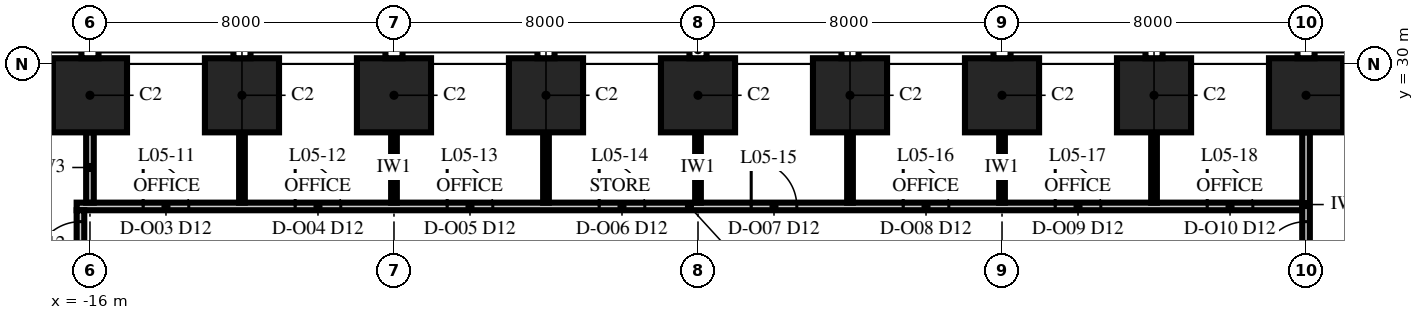
"""IFC4 building model, lengths in metres.
Left out: names, types, materials, properties, quantities, classifications, styles, units other than length and angle.
Written with IfcOpenShell. Run it as: python <this file> out.ifc"""

import sys

from ifc_helpers import new_model, si_unit, direction, frame, frame_2d, origin, origin_2d, place, context, subcontext, project, spatial, rectangle, extrude, element, fill, save


model = new_model("IFC4")
c1 = context("Model", 3, precision=1e-05, world=origin(), true_north=direction((0.0, 1.0)))
c2 = subcontext(c1, "Body", "Model", "MODEL_VIEW")
j1 = project(units=[si_unit("LENGTHUNIT", "METRE"), si_unit("PLANEANGLEUNIT", "RADIAN")], contexts=[c1])
p1 = place(None, origin())
s1 = spatial("IfcSite", under=j1, at=p1, CompositionType="ELEMENT")
p2 = place(p1, origin())
s2 = spatial("IfcBuilding", under=s1, at=p2, CompositionType="ELEMENT")
p3 = place(p2, frame((0.0, 0.0, 32.0)))
s3 = spatial("IfcBuildingStorey", under=s2, at=p3, CompositionType="ELEMENT", Elevation=32.0)
for number, where, z_axis, x_axis in (
    (1, (16.0, 29.175, 0.0), (0.0, 0.0, 1.0), (-1.0, 0.0, 0.0)),
    (2, (12.0, 29.175, 0.0), (0.0, 0.0, 1.0), (-1.0, 0.0, 0.0)),
    (3, (8.0, 29.175, 0.0), (0.0, 0.0, 1.0), (-1.0, 0.0, 0.0)),
    (4, (4.0, 29.175, 0.0), (0.0, 0.0, 1.0), (-1.0, 0.0, 0.0)),
    (5, (0.0, 29.175, 0.0), (0.0, 0.0, 1.0), (-1.0, 0.0, 0.0)),
    (6, (-4.0, 29.175, 0.0), (0.0, 0.0, 1.0), (-1.0, 0.0, 0.0)),
    (7, (-8.0, 29.175, 0.0), (0.0, 0.0, 1.0), (-1.0, 0.0, 0.0)),
    (8, (-12.0, 29.175, 0.0), (0.0, 0.0, 1.0), (-1.0, 0.0, 0.0)),
    (9, (-16.0, 29.175, 0.0), (0.0, 0.0, 1.0), (-1.0, 0.0, 0.0)),
):
    element("IfcColumn", number, at=place(p3, frame(where, z_axis=z_axis, x_axis=x_axis)), inside=s3, PredefinedType="COLUMN", context=c2, shape_type="SweptSolid", body=[
        extrude(rectangle(XDim=1.95, YDim=1.95, at=origin_2d()), origin(), (0.0, 0.0, 1.0), 4.0),
    ])
p4 = place(p3, frame((-16.35, 26.25, 0.0), z_axis=(0.0, 0.0, 1.0), x_axis=(1.0, 0.0, 0.0)))
e10 = element("IfcWall", 10, at=p4, inside=s3, PredefinedType="PARTITIONING", context=c2, shape_type="SweptSolid", body=[
    extrude(rectangle(XDim=32.25, YDim=0.2, at=frame_2d((16.125, 0.0))), origin(), (0.0, 0.0, 1.0), 3.4),
])
p5 = place(p4, frame((1.75, 0.0, 0.0)))
e11 = element("IfcOpeningElement", 11, at=p5, cuts=e10, PredefinedType="OPENING", context=c2, shape_type="SweptSolid", body=[
    extrude(rectangle(XDim=1.2, YDim=2.4, at=frame_2d((0.6, 1.2))), frame((0.0, 0.115, 0.0), z_axis=(0.0, -1.0, 0.0), x_axis=(1.0, 0.0, 0.0)), (0.0, 0.0, 1.0), 0.23),
])
p6 = place(p4, frame((5.75, 0.0, 0.0)))
e12 = element("IfcOpeningElement", 12, at=p6, cuts=e10, PredefinedType="OPENING", context=c2, shape_type="SweptSolid", body=[
    extrude(rectangle(XDim=1.2, YDim=2.4, at=frame_2d((0.6, 1.2))), frame((0.0, 0.115, 0.0), z_axis=(0.0, -1.0, 0.0), x_axis=(1.0, 0.0, 0.0)), (0.0, 0.0, 1.0), 0.23),
])
p7 = place(p4, frame((9.75, 0.0, 0.0)))
e13 = element("IfcOpeningElement", 13, at=p7, cuts=e10, PredefinedType="OPENING", context=c2, shape_type="SweptSolid", body=[
    extrude(rectangle(XDim=1.2, YDim=2.4, at=frame_2d((0.6, 1.2))), frame((0.0, 0.115, 0.0), z_axis=(0.0, -1.0, 0.0), x_axis=(1.0, 0.0, 0.0)), (0.0, 0.0, 1.0), 0.23),
])
p8 = place(p4, frame((13.75, 0.0, 0.0)))
e14 = element("IfcOpeningElement", 14, at=p8, cuts=e10, PredefinedType="OPENING", context=c2, shape_type="SweptSolid", body=[
    extrude(rectangle(XDim=1.2, YDim=2.4, at=frame_2d((0.6, 1.2))), frame((0.0, 0.115, 0.0), z_axis=(0.0, -1.0, 0.0), x_axis=(1.0, 0.0, 0.0)), (0.0, 0.0, 1.0), 0.23),
])
p9 = place(p4, frame((17.75, 0.0, 0.0)))
e15 = element("IfcOpeningElement", 15, at=p9, cuts=e10, PredefinedType="OPENING", context=c2, shape_type="SweptSolid", body=[
    extrude(rectangle(XDim=1.2, YDim=2.4, at=frame_2d((0.6, 1.2))), frame((0.0, 0.115, 0.0), z_axis=(0.0, -1.0, 0.0), x_axis=(1.0, 0.0, 0.0)), (0.0, 0.0, 1.0), 0.23),
])
p10 = place(p4, frame((21.75, 0.0, 0.0)))
e16 = element("IfcOpeningElement", 16, at=p10, cuts=e10, PredefinedType="OPENING", context=c2, shape_type="SweptSolid", body=[
    extrude(rectangle(XDim=1.2, YDim=2.4, at=frame_2d((0.6, 1.2))), frame((0.0, 0.115, 0.0), z_axis=(0.0, -1.0, 0.0), x_axis=(1.0, 0.0, 0.0)), (0.0, 0.0, 1.0), 0.23),
])
p11 = place(p4, frame((25.75, 0.0, 0.0)))
e17 = element("IfcOpeningElement", 17, at=p11, cuts=e10, PredefinedType="OPENING", context=c2, shape_type="SweptSolid", body=[
    extrude(rectangle(XDim=1.2, YDim=2.4, at=frame_2d((0.6, 1.2))), frame((0.0, 0.115, 0.0), z_axis=(0.0, -1.0, 0.0), x_axis=(1.0, 0.0, 0.0)), (0.0, 0.0, 1.0), 0.23),
])
p12 = place(p4, frame((29.75, 0.0, 0.0)))
e18 = element("IfcOpeningElement", 18, at=p12, cuts=e10, PredefinedType="OPENING", context=c2, shape_type="SweptSolid", body=[
    extrude(rectangle(XDim=1.2, YDim=2.4, at=frame_2d((0.6, 1.2))), frame((0.0, 0.115, 0.0), z_axis=(0.0, -1.0, 0.0), x_axis=(1.0, 0.0, 0.0)), (0.0, 0.0, 1.0), 0.23),
])
p13 = place(p3, frame((-16.25, 9.9, 0.0), z_axis=(0.0, 0.0, 1.0), x_axis=(0.0, 1.0, 0.0)))
e19 = element("IfcWall", 19, at=p13, inside=s3, PredefinedType="PARTITIONING", context=c2, shape_type="SweptSolid", body=[
    extrude(rectangle(XDim=16.25, YDim=0.2, at=frame_2d((8.125, 0.0))), origin(), (0.0, 0.0, 1.0), 3.25),
])
p14 = place(p13, frame((14.75, 0.0, 0.0)))
e20 = element("IfcOpeningElement", 20, at=p14, cuts=e19, PredefinedType="OPENING", context=c2, shape_type="SweptSolid", body=[
    extrude(rectangle(XDim=1.2, YDim=2.4, at=frame_2d((0.6, 1.2))), frame((0.0, 0.115, 0.0), z_axis=(0.0, -1.0, 0.0), x_axis=(1.0, 0.0, 0.0)), (0.0, 0.0, 1.0), 0.23),
])
p15 = place(p3, frame((-16.0, 26.35, 0.0), z_axis=(0.0, 0.0, 1.0), x_axis=(0.0, 1.0, 0.0)))
e21 = element("IfcWall", 21, at=p15, inside=s3, PredefinedType="PARTITIONING", context=c2, shape_type="SweptSolid", body=[
    extrude(rectangle(XDim=1.85, YDim=0.2, at=frame_2d((0.925, 0.0))), origin(), (0.0, 0.0, 1.0), 3.4),
])
p16 = place(p3, frame((-12.0, 26.35, 0.0), z_axis=(0.0, 0.0, 1.0), x_axis=(0.0, 1.0, 0.0)))
e22 = element("IfcWall", 22, at=p16, inside=s3, PredefinedType="PARTITIONING", context=c2, shape_type="SweptSolid", body=[
    extrude(rectangle(XDim=1.85, YDim=0.15, at=frame_2d((0.925, 0.0))), origin(), (0.0, 0.0, 1.0), 3.85),
])
p17 = place(p3, frame((-8.0, 26.35, 0.0), z_axis=(0.0, 0.0, 1.0), x_axis=(0.0, 1.0, 0.0)))
e23 = element("IfcWall", 23, at=p17, inside=s3, PredefinedType="PARTITIONING", context=c2, shape_type="SweptSolid", body=[
    extrude(rectangle(XDim=1.85, YDim=0.15, at=frame_2d((0.925, 0.0))), origin(), (0.0, 0.0, 1.0), 3.4),
])
p18 = place(p3, frame((-4.0, 26.35, 0.0), z_axis=(0.0, 0.0, 1.0), x_axis=(0.0, 1.0, 0.0)))
e24 = element("IfcWall", 24, at=p18, inside=s3, PredefinedType="PARTITIONING", context=c2, shape_type="SweptSolid", body=[
    extrude(rectangle(XDim=1.85, YDim=0.15, at=frame_2d((0.925, 0.0))), origin(), (0.0, 0.0, 1.0), 3.85),
])
p19 = place(p3, frame((0.0, 26.35, 0.0), z_axis=(0.0, 0.0, 1.0), x_axis=(0.0, 1.0, 0.0)))
e25 = element("IfcWall", 25, at=p19, inside=s3, PredefinedType="PARTITIONING", context=c2, shape_type="SweptSolid", body=[
    extrude(rectangle(XDim=1.85, YDim=0.15, at=frame_2d((0.925, 0.0))), origin(), (0.0, 0.0, 1.0), 3.4),
])
p20 = place(p3, frame((4.0, 26.35, 0.0), z_axis=(0.0, 0.0, 1.0), x_axis=(0.0, 1.0, 0.0)))
e26 = element("IfcWall", 26, at=p20, inside=s3, PredefinedType="PARTITIONING", context=c2, shape_type="SweptSolid", body=[
    extrude(rectangle(XDim=1.85, YDim=0.15, at=frame_2d((0.925, 0.0))), origin(), (0.0, 0.0, 1.0), 3.85),
])
p21 = place(p3, frame((8.0, 26.35, 0.0), z_axis=(0.0, 0.0, 1.0), x_axis=(0.0, 1.0, 0.0)))
e27 = element("IfcWall", 27, at=p21, inside=s3, PredefinedType="PARTITIONING", context=c2, shape_type="SweptSolid", body=[
    extrude(rectangle(XDim=1.85, YDim=0.15, at=frame_2d((0.925, 0.0))), origin(), (0.0, 0.0, 1.0), 3.4),
])
p22 = place(p3, frame((12.0, 26.35, 0.0), z_axis=(0.0, 0.0, 1.0), x_axis=(0.0, 1.0, 0.0)))
e28 = element("IfcWall", 28, at=p22, inside=s3, PredefinedType="PARTITIONING", context=c2, shape_type="SweptSolid", body=[
    extrude(rectangle(XDim=1.85, YDim=0.15, at=frame_2d((0.925, 0.0))), origin(), (0.0, 0.0, 1.0), 3.85),
])
p23 = place(p3, frame((16.0, 24.4, 0.0), z_axis=(0.0, 0.0, 1.0), x_axis=(0.0, 1.0, 0.0)))
e29 = element("IfcWall", 29, at=p23, inside=s3, PredefinedType="PARTITIONING", context=c2, shape_type="SweptSolid", body=[
    extrude(rectangle(XDim=3.8, YDim=0.2, at=frame_2d((1.9, 0.0))), origin(), (0.0, 0.0, 1.0), 3.4),
])
p24 = place(p23, frame((0.25, 0.0, 0.0)))
e30 = element("IfcOpeningElement", 30, at=p24, cuts=e29, PredefinedType="OPENING", context=c2, shape_type="SweptSolid", body=[
    extrude(rectangle(XDim=1.2, YDim=2.4, at=frame_2d((0.6, 1.2))), frame((0.0, 0.115, 0.0), z_axis=(0.0, -1.0, 0.0), x_axis=(1.0, 0.0, 0.0)), (0.0, 0.0, 1.0), 0.23),
])
p25 = place(p5, origin())
e31 = element("IfcDoor", 31, at=p25, inside=s3, OperationType="SINGLE_SWING_LEFT", PredefinedType="DOOR", context=c2, shape_type="SweptSolid", body=[
    extrude(rectangle(XDim=1.2, YDim=2.4, at=frame_2d((0.6, 1.2))), frame((0.0, 0.1, 0.0), z_axis=(0.0, -1.0, 0.0), x_axis=(1.0, 0.0, 0.0)), (0.0, 0.0, 1.0), 0.199),
])
fill(e11, e31)
p26 = place(p6, origin())
e32 = element("IfcDoor", 32, at=p26, inside=s3, OperationType="SINGLE_SWING_LEFT", PredefinedType="DOOR", context=c2, shape_type="SweptSolid", body=[
    extrude(rectangle(XDim=1.2, YDim=2.4, at=frame_2d((0.6, 1.2))), frame((0.0, 0.1, 0.0), z_axis=(0.0, -1.0, 0.0), x_axis=(1.0, 0.0, 0.0)), (0.0, 0.0, 1.0), 0.199),
])
fill(e12, e32)
p27 = place(p7, origin())
e33 = element("IfcDoor", 33, at=p27, inside=s3, OperationType="SINGLE_SWING_LEFT", PredefinedType="DOOR", context=c2, shape_type="SweptSolid", body=[
    extrude(rectangle(XDim=1.2, YDim=2.4, at=frame_2d((0.6, 1.2))), frame((0.0, 0.1, 0.0), z_axis=(0.0, -1.0, 0.0), x_axis=(1.0, 0.0, 0.0)), (0.0, 0.0, 1.0), 0.199),
])
fill(e13, e33)
p28 = place(p8, origin())
e34 = element("IfcDoor", 34, at=p28, inside=s3, OperationType="SINGLE_SWING_LEFT", PredefinedType="DOOR", context=c2, shape_type="SweptSolid", body=[
    extrude(rectangle(XDim=1.2, YDim=2.4, at=frame_2d((0.6, 1.2))), frame((0.0, 0.1, 0.0), z_axis=(0.0, -1.0, 0.0), x_axis=(1.0, 0.0, 0.0)), (0.0, 0.0, 1.0), 0.199),
])
fill(e14, e34)
p29 = place(p9, origin())
e35 = element("IfcDoor", 35, at=p29, inside=s3, OperationType="SINGLE_SWING_LEFT", PredefinedType="DOOR", context=c2, shape_type="SweptSolid", body=[
    extrude(rectangle(XDim=1.2, YDim=2.4, at=frame_2d((0.6, 1.2))), frame((0.0, 0.1, 0.0), z_axis=(0.0, -1.0, 0.0), x_axis=(1.0, 0.0, 0.0)), (0.0, 0.0, 1.0), 0.199),
])
fill(e15, e35)
p30 = place(p10, origin())
e36 = element("IfcDoor", 36, at=p30, inside=s3, OperationType="SINGLE_SWING_LEFT", PredefinedType="DOOR", context=c2, shape_type="SweptSolid", body=[
    extrude(rectangle(XDim=1.2, YDim=2.4, at=frame_2d((0.6, 1.2))), frame((0.0, 0.1, 0.0), z_axis=(0.0, -1.0, 0.0), x_axis=(1.0, 0.0, 0.0)), (0.0, 0.0, 1.0), 0.199),
])
fill(e16, e36)
p31 = place(p11, origin())
e37 = element("IfcDoor", 37, at=p31, inside=s3, OperationType="SINGLE_SWING_LEFT", PredefinedType="DOOR", context=c2, shape_type="SweptSolid", body=[
    extrude(rectangle(XDim=1.2, YDim=2.4, at=frame_2d((0.6, 1.2))), frame((0.0, 0.1, 0.0), z_axis=(0.0, -1.0, 0.0), x_axis=(1.0, 0.0, 0.0)), (0.0, 0.0, 1.0), 0.199),
])
fill(e17, e37)
p32 = place(p12, origin())
e38 = element("IfcDoor", 38, at=p32, inside=s3, OperationType="SINGLE_SWING_LEFT", PredefinedType="DOOR", context=c2, shape_type="SweptSolid", body=[
    extrude(rectangle(XDim=1.2, YDim=2.4, at=frame_2d((0.6, 1.2))), frame((0.0, 0.1, 0.0), z_axis=(0.0, -1.0, 0.0), x_axis=(1.0, 0.0, 0.0)), (0.0, 0.0, 1.0), 0.199),
])
fill(e18, e38)
p33 = place(p14, origin())
e39 = element("IfcDoor", 39, at=p33, inside=s3, OperationType="SINGLE_SWING_LEFT", PredefinedType="DOOR", context=c2, shape_type="SweptSolid", body=[
    extrude(rectangle(XDim=1.2, YDim=2.4, at=frame_2d((0.6, 1.2))), frame((0.0, 0.1, 0.0), z_axis=(0.0, -1.0, 0.0), x_axis=(1.0, 0.0, 0.0)), (0.0, 0.0, 1.0), 0.199),
])
fill(e20, e39)
p34 = place(p24, origin())
e40 = element("IfcDoor", 40, at=p34, inside=s3, OperationType="SINGLE_SWING_LEFT", PredefinedType="DOOR", context=c2, shape_type="SweptSolid", body=[
    extrude(rectangle(XDim=1.2, YDim=2.4, at=frame_2d((0.6, 1.2))), frame((0.0, 0.1, 0.0), z_axis=(0.0, -1.0, 0.0), x_axis=(1.0, 0.0, 0.0)), (0.0, 0.0, 1.0), 0.199),
])
fill(e30, e40)
save(model, sys.argv[1])
